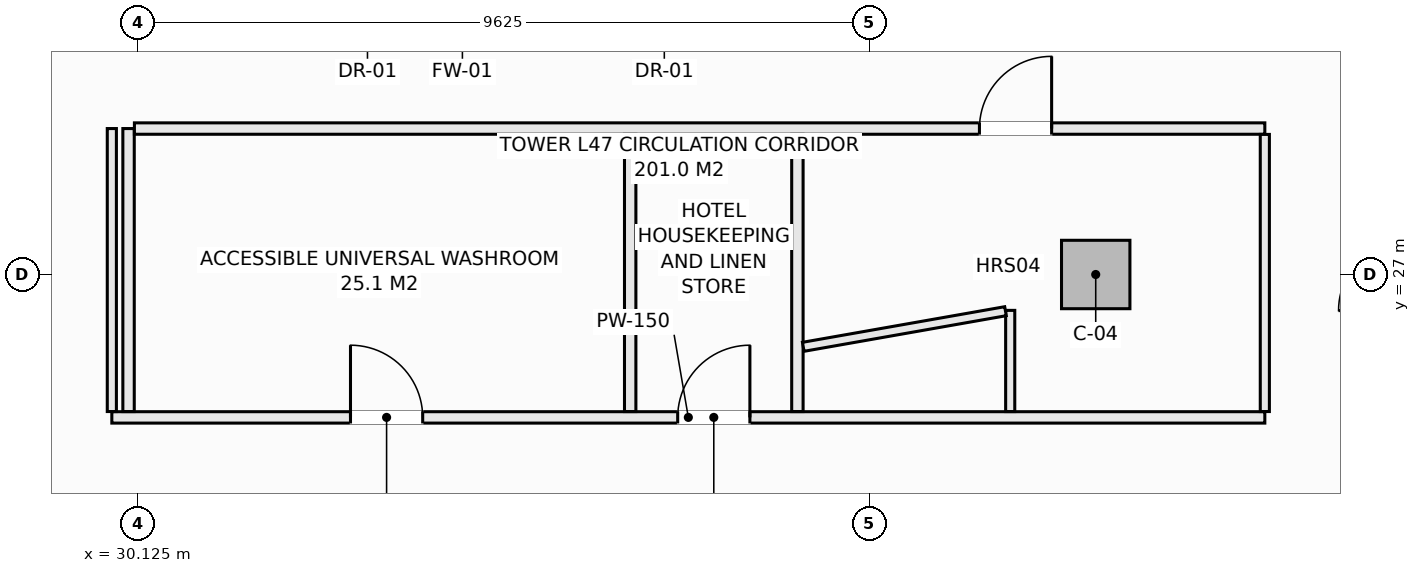
"""IFC4 building model, lengths in metres.
Left out: names, types, materials, properties, quantities, classifications, styles, units other than length and angle.
Written with IfcOpenShell. Run it as: python <this file> out.ifc"""

import sys

from ifc_helpers import new_model, si_unit, direction, frame, frame_2d, origin, origin_2d, place, context, subcontext, project, spatial, rectangle, extrude, element, fill, save


model = new_model("IFC4")
c1 = context("Model", 3, precision=1e-05, world=origin(), true_north=direction((0.0, 1.0)))
c2 = subcontext(c1, "Body", "Model", "MODEL_VIEW")
j1 = project(units=[si_unit("LENGTHUNIT", "METRE"), si_unit("PLANEANGLEUNIT", "RADIAN")], contexts=[c1])
p1 = place(None, origin())
s1 = spatial("IfcSite", under=j1, at=p1, CompositionType="ELEMENT")
p2 = place(p1, origin())
s2 = spatial("IfcBuilding", under=s1, at=p2, CompositionType="ELEMENT")
p3 = place(p2, frame((0.0, 0.0, 180.1)))
s3 = spatial("IfcBuildingStorey", under=s2, at=p3, CompositionType="ELEMENT", Elevation=180.1)
p4 = place(p3, frame((42.725, 27.0, -0.27), z_axis=(0.0, 0.0, 1.0), x_axis=(1.0, 0.0, 0.0)))
e1 = element("IfcColumn", 1, at=p4, inside=s3, PredefinedType="COLUMN", context=c2, shape_type="SweptSolid", body=[
    extrude(rectangle(XDim=0.9, YDim=0.9, at=origin_2d()), origin(), (0.0, 0.0, 1.0), 3.4),
])
p5 = place(p3, frame((29.78, 25.12, 0.0), z_axis=(0.0, 0.0, 1.0), x_axis=(1.0, 0.0, 0.0)))
e2 = element("IfcWall", 2, at=p5, inside=s3, PredefinedType="PARTITIONING", context=c2, shape_type="SweptSolid", body=[
    extrude(rectangle(XDim=15.17, YDim=0.15, at=frame_2d((7.585, 0.0))), origin(), (0.0, 0.0, 1.0), 3.13),
])
p6 = place(p5, frame((3.14, 0.0, 0.0)))
e3 = element("IfcOpeningElement", 3, at=p6, cuts=e2, PredefinedType="OPENING", context=c2, shape_type="SweptSolid", body=[
    extrude(rectangle(XDim=0.95, YDim=2.1, at=frame_2d((0.475, 1.05))), frame((0.0, 0.085, 0.0), z_axis=(0.0, -1.0, 0.0), x_axis=(1.0, 0.0, 0.0)), (0.0, 0.0, 1.0), 0.17),
])
p7 = place(p5, frame((7.445, 0.0, 0.0)))
e4 = element("IfcOpeningElement", 4, at=p7, cuts=e2, PredefinedType="OPENING", context=c2, shape_type="SweptSolid", body=[
    extrude(rectangle(XDim=0.95, YDim=2.1, at=frame_2d((0.475, 1.05))), frame((0.0, 0.085, 0.0), z_axis=(0.0, -1.0, 0.0), x_axis=(1.0, 0.0, 0.0)), (0.0, 0.0, 1.0), 0.17),
])
p8 = place(p3, frame((30.0, 25.197, 0.0), z_axis=(0.0, 0.0, 1.0), x_axis=(0.0, 1.0, 0.0)))
e5 = element("IfcWall", 5, at=p8, inside=s3, PredefinedType="PARTITIONING", context=c2, shape_type="SweptSolid", body=[
    extrude(rectangle(XDim=3.723, YDim=0.15, at=frame_2d((1.861, 0.0))), origin(), (0.0, 0.0, 1.0), 3.13),
])
p9 = place(p3, frame((30.077, 28.92, 0.0), z_axis=(0.0, 0.0, 1.0), x_axis=(1.0, 0.0, 0.0)))
e6 = element("IfcWall", 6, at=p9, inside=s3, PredefinedType="PARTITIONING", context=c2, shape_type="SweptSolid", body=[
    extrude(rectangle(XDim=14.873, YDim=0.15, at=frame_2d((7.437, 0.0))), origin(), (0.0, 0.0, 1.0), 3.13),
])
p10 = place(p9, frame((11.118, 0.0, 0.0)))
e7 = element("IfcOpeningElement", 7, at=p10, cuts=e6, PredefinedType="OPENING", context=c2, shape_type="SweptSolid", body=[
    extrude(rectangle(XDim=0.95, YDim=2.1, at=frame_2d((0.475, 1.05))), frame((0.0, 0.085, 0.0), z_axis=(0.0, -1.0, 0.0), x_axis=(1.0, 0.0, 0.0)), (0.0, 0.0, 1.0), 0.17),
])
for number, where, z_axis, x_axis in (
    (8, (36.6, 25.197, 0.0), (0.0, 0.0, 1.0), (0.0, 1.0, 0.0)),
    (9, (38.8, 25.197, 0.0), (0.0, 0.0, 1.0), (0.0, 1.0, 0.0)),
):
    element("IfcWall", number, at=place(p3, frame(where, z_axis=z_axis, x_axis=x_axis)), inside=s3, PredefinedType="PARTITIONING", context=c2, shape_type="SweptSolid", body=[
        extrude(rectangle(XDim=3.646, YDim=0.15, at=frame_2d((1.823, 0.0))), origin(), (0.0, 0.0, 1.0), 3.13),
    ])
p11 = place(p3, frame((29.78, 25.197, 0.0), z_axis=(0.0, 0.0, 1.0), x_axis=(0.0, 1.0, 0.0)))
e10 = element("IfcWall", 10, at=p11, inside=s3, PredefinedType="PARTITIONING", context=c2, shape_type="SweptSolid", body=[
    extrude(rectangle(XDim=3.723, YDim=0.12, at=frame_2d((1.861, 0.0))), origin(), (0.0, 0.0, 1.0), 3.13),
])
p12 = place(p3, frame((44.95, 25.197, 0.0), z_axis=(0.0, 0.0, 1.0), x_axis=(0.0, 1.0, 0.0)))
e11 = element("IfcWall", 11, at=p12, inside=s3, PredefinedType="PARTITIONING", context=c2, shape_type="SweptSolid", body=[
    extrude(rectangle(XDim=3.646, YDim=0.12, at=frame_2d((1.823, 0.0))), origin(), (0.0, 0.0, 1.0), 3.13),
])
p13 = place(p3, frame((41.6, 25.197, 0.0), z_axis=(0.0, 0.0, 1.0), x_axis=(0.0, 1.0, 0.0)))
e12 = element("IfcWall", 12, at=p13, inside=s3, PredefinedType="PARTITIONING", context=c2, shape_type="SweptSolid", body=[
    extrude(rectangle(XDim=1.331, YDim=0.12, at=frame_2d((0.666, 0.0))), origin(), (0.0, 0.0, 1.0), 3.13),
])
p14 = place(p3, frame((38.877, 26.049, 0.0), z_axis=(0.0, 0.0, 1.0), x_axis=(0.984853517989, 0.173388431286, 0.0)))
e13 = element("IfcWall", 13, at=p14, inside=s3, PredefinedType="PARTITIONING", context=c2, shape_type="SweptSolid", body=[
    extrude(rectangle(XDim=2.702, YDim=0.12, at=frame_2d((1.351, 0.0))), origin(), (0.0, 0.0, 1.0), 3.13),
])
p15 = place(p6, origin())
e14 = element("IfcDoor", 14, at=p15, inside=s3, OperationType="SINGLE_SWING_LEFT", PredefinedType="DOOR", context=c2, shape_type="SweptSolid", body=[
    extrude(rectangle(XDim=0.95, YDim=2.1, at=frame_2d((0.475, 1.05))), frame((0.0, 0.025, 0.0), z_axis=(0.0, -1.0, 0.0), x_axis=(1.0, 0.0, 0.0)), (0.0, 0.0, 1.0), 0.05),
])
fill(e3, e14)
p16 = place(p7, origin())
e15 = element("IfcDoor", 15, at=p16, inside=s3, OperationType="SINGLE_SWING_RIGHT", PredefinedType="DOOR", context=c2, shape_type="SweptSolid", body=[
    extrude(rectangle(XDim=0.95, YDim=2.1, at=frame_2d((0.475, 1.05))), frame((0.0, 0.025, 0.0), z_axis=(0.0, -1.0, 0.0), x_axis=(1.0, 0.0, 0.0)), (0.0, 0.0, 1.0), 0.05),
])
fill(e4, e15)
p17 = place(p10, origin())
e16 = element("IfcDoor", 16, at=p17, inside=s3, OperationType="SINGLE_SWING_RIGHT", PredefinedType="DOOR", context=c2, shape_type="SweptSolid", body=[
    extrude(rectangle(XDim=0.95, YDim=2.1, at=frame_2d((0.475, 1.05))), frame((0.0, 0.025, 0.0), z_axis=(0.0, -1.0, 0.0), x_axis=(1.0, 0.0, 0.0)), (0.0, 0.0, 1.0), 0.05),
])
fill(e7, e16)
save(model, sys.argv[1])
